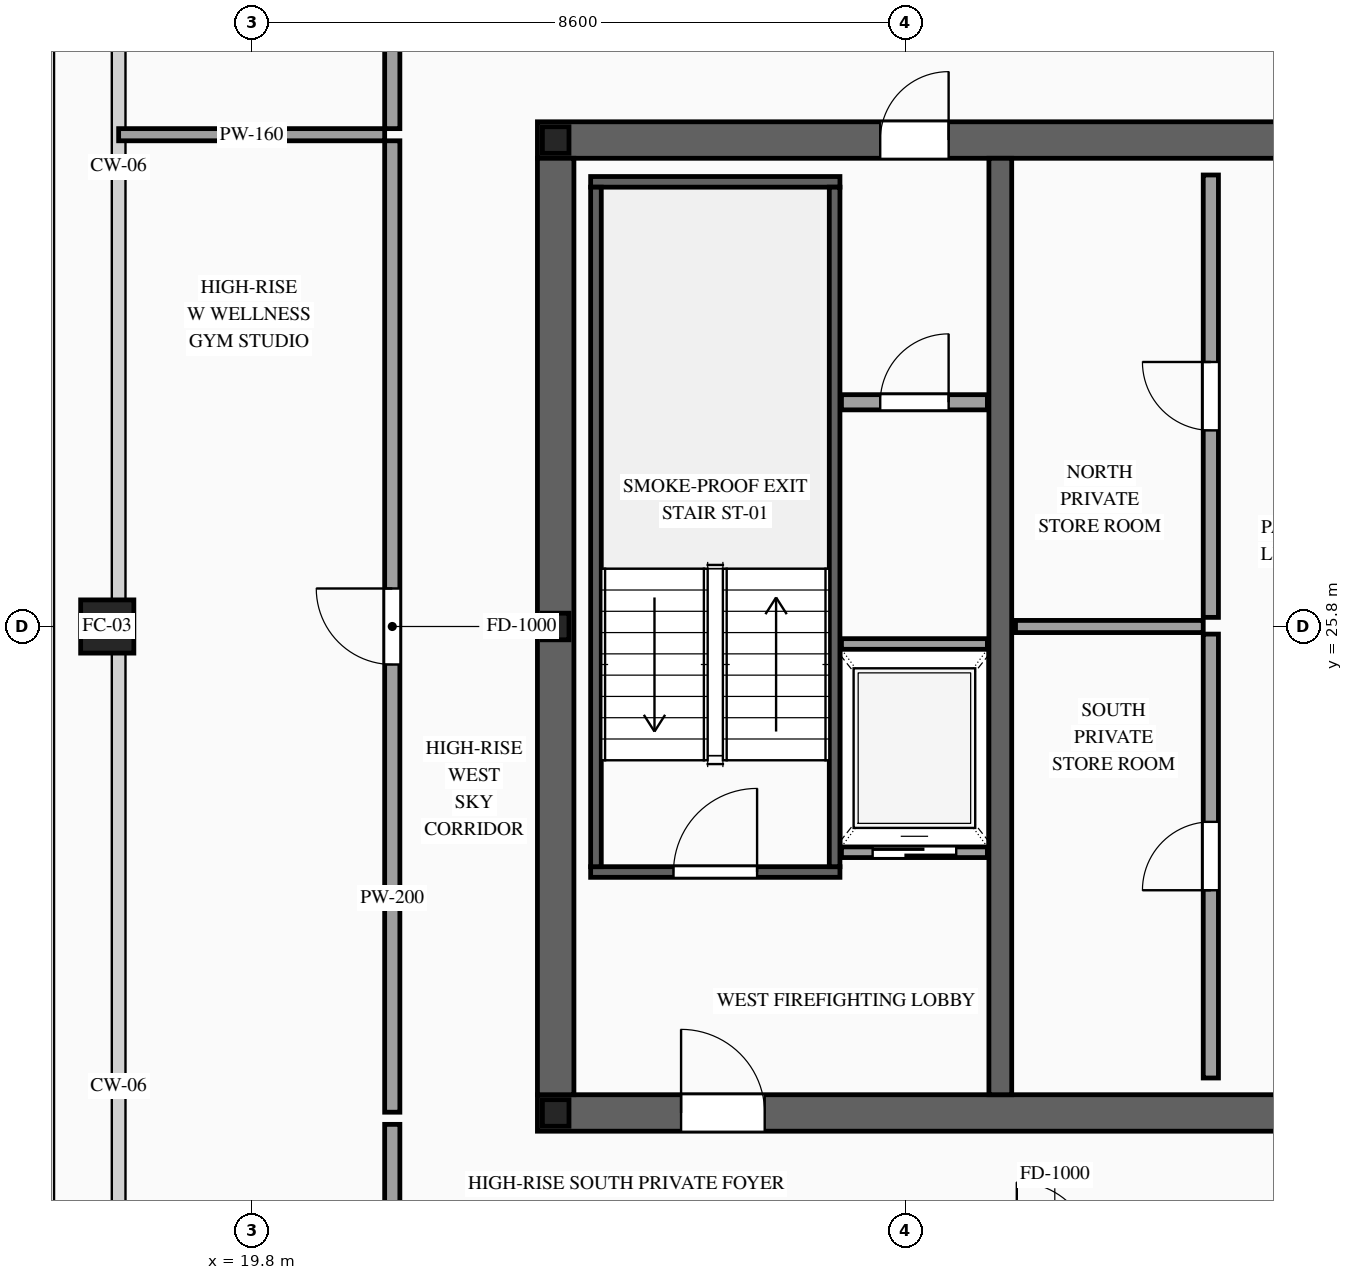
"""IFC4 building model, lengths in metres.
Left out: names, types, materials, properties, quantities, classifications, styles, units other than length and angle.
Written with IfcOpenShell. Run it as: python <this file> out.ifc"""

import sys

from ifc_helpers import new_model, si_unit, direction, frame, frame_2d, origin, origin_2d, place, context, subcontext, project, spatial, rectangle, hollow_rectangle, i_section, extrude, source, transform, mapped, element, fill, save


model = new_model("IFC4")
c1 = context("Model", 3, precision=1e-05, world=origin(), true_north=direction((0.0, 1.0)))
c2 = subcontext(c1, "Body", "Model", "MODEL_VIEW")
j1 = project(units=[si_unit("LENGTHUNIT", "METRE"), si_unit("PLANEANGLEUNIT", "RADIAN")], contexts=[c1])
p1 = place(None, origin())
s1 = spatial("IfcSite", under=j1, at=p1, CompositionType="ELEMENT")
p2 = place(p1, origin())
s2 = spatial("IfcBuilding", under=s1, at=p2, CompositionType="ELEMENT")
p3 = place(p2, frame((0.0, 0.0, 296.1)))
s3 = spatial("IfcBuildingStorey", under=s2, at=p3, CompositionType="ELEMENT", Elevation=296.1)
p4 = place(p3, frame((23.56, 19.4, 0.0), z_axis=(0.0, 0.0, 1.0), x_axis=(1.0, 0.0, 0.0)))
e1 = element("IfcWall", 1, at=p4, inside=s3, PredefinedType="SHEAR", context=c2, shape_type="SweptSolid", body=[
    extrude(rectangle(XDim=26.88, YDim=0.48, at=frame_2d((13.44, 0.0))), origin(), (0.0, 0.0, 1.0), 3.5),
])
p5 = place(p4, frame((1.89, 0.0, 0.0)))
e2 = element("IfcOpeningElement", 2, at=p5, cuts=e1, PredefinedType="OPENING", context=c2, shape_type="SweptSolid", body=[
    extrude(rectangle(XDim=1.1, YDim=2.2, at=frame_2d((0.55, 1.1))), frame((0.0, 0.255, 0.0), z_axis=(0.0, -1.0, 0.0), x_axis=(1.0, 0.0, 0.0)), (0.0, 0.0, 1.0), 0.51),
])
p6 = place(p4, frame((9.79, 0.0, 0.0)))
e3 = element("IfcOpeningElement", 3, at=p6, cuts=e1, PredefinedType="OPENING", context=c2, shape_type="SweptSolid", body=[
    extrude(rectangle(XDim=1.1, YDim=2.2, at=frame_2d((0.55, 1.1))), frame((0.0, 0.255, 0.0), z_axis=(0.0, -1.0, 0.0), x_axis=(1.0, 0.0, 0.0)), (0.0, 0.0, 1.0), 0.51),
])
p7 = place(p4, frame((22.99, 0.0, 0.0)))
e4 = element("IfcOpeningElement", 4, at=p7, cuts=e1, PredefinedType="OPENING", context=c2, shape_type="SweptSolid", body=[
    extrude(rectangle(XDim=1.1, YDim=2.2, at=frame_2d((0.55, 1.1))), frame((0.0, 0.255, 0.0), z_axis=(0.0, -1.0, 0.0), x_axis=(1.0, 0.0, 0.0)), (0.0, 0.0, 1.0), 0.51),
])
p8 = place(p4, frame((19.61, 0.0, 0.0)))
e5 = element("IfcOpeningElement", 5, at=p8, cuts=e1, PredefinedType="OPENING", context=c2, shape_type="SweptSolid", body=[
    extrude(rectangle(XDim=0.9, YDim=2.15, at=frame_2d((0.45, 1.075))), frame((0.0, 0.255, 0.0), z_axis=(0.0, -1.0, 0.0), x_axis=(1.0, 0.0, 0.0)), (0.0, 0.0, 1.0), 0.51),
])
p9 = place(p4, frame((18.17, 0.0, 0.0)))
e6 = element("IfcOpeningElement", 6, at=p9, cuts=e1, PredefinedType="OPENING", context=c2, shape_type="SweptSolid", body=[
    extrude(rectangle(XDim=0.9, YDim=2.15, at=frame_2d((0.45, 1.075))), frame((0.0, 0.255, 0.0), z_axis=(0.0, -1.0, 0.0), x_axis=(1.0, 0.0, 0.0)), (0.0, 0.0, 1.0), 0.51),
])
p10 = place(p3, frame((23.56, 32.2, 0.0), z_axis=(0.0, 0.0, 1.0), x_axis=(1.0, 0.0, 0.0)))
e7 = element("IfcWall", 7, at=p10, inside=s3, PredefinedType="SHEAR", context=c2, shape_type="SweptSolid", body=[
    extrude(rectangle(XDim=26.88, YDim=0.48, at=frame_2d((13.44, 0.0))), origin(), (0.0, 0.0, 1.0), 3.5),
])
p11 = place(p10, frame((4.51, 0.0, 0.0)))
e8 = element("IfcOpeningElement", 8, at=p11, cuts=e7, PredefinedType="OPENING", context=c2, shape_type="SweptSolid", body=[
    extrude(rectangle(XDim=0.9, YDim=2.15, at=frame_2d((0.45, 1.075))), frame((0.0, 0.255, 0.0), z_axis=(0.0, -1.0, 0.0), x_axis=(1.0, 0.0, 0.0)), (0.0, 0.0, 1.0), 0.51),
])
p12 = place(p10, frame((9.79, 0.0, 0.0)))
e9 = element("IfcOpeningElement", 9, at=p12, cuts=e7, PredefinedType="OPENING", context=c2, shape_type="SweptSolid", body=[
    extrude(rectangle(XDim=1.1, YDim=2.2, at=frame_2d((0.55, 1.1))), frame((0.0, 0.255, 0.0), z_axis=(0.0, -1.0, 0.0), x_axis=(1.0, 0.0, 0.0)), (0.0, 0.0, 1.0), 0.51),
])
p13 = place(p10, frame((15.64, 0.0, 0.0)))
e10 = element("IfcOpeningElement", 10, at=p13, cuts=e7, PredefinedType="OPENING", context=c2, shape_type="SweptSolid", body=[
    extrude(rectangle(XDim=1.1, YDim=2.2, at=frame_2d((0.55, 1.1))), frame((0.0, 0.255, 0.0), z_axis=(0.0, -1.0, 0.0), x_axis=(1.0, 0.0, 0.0)), (0.0, 0.0, 1.0), 0.51),
])
p14 = place(p10, frame((18.74, 0.0, 0.0)))
e11 = element("IfcOpeningElement", 11, at=p14, cuts=e7, PredefinedType="OPENING", context=c2, shape_type="SweptSolid", body=[
    extrude(rectangle(XDim=1.1, YDim=2.2, at=frame_2d((0.55, 1.1))), frame((0.0, 0.255, 0.0), z_axis=(0.0, -1.0, 0.0), x_axis=(1.0, 0.0, 0.0)), (0.0, 0.0, 1.0), 0.51),
])
m1 = source(origin(), c2, "Body", "SweptSolid", [
    extrude(rectangle(XDim=12.32, YDim=0.48, at=frame_2d((6.16, 0.0))), origin(), (0.0, 0.0, 1.0), 3.5),
])
p15 = place(p3, frame((23.8, 19.64, 0.0), z_axis=(0.0, 0.0, 1.0), x_axis=(0.0, 1.0, 0.0)))
e12 = element("IfcWall", 12, at=p15, inside=s3, PredefinedType="SHEAR", context=c2, shape_type="MappedRepresentation", body=[
    mapped(m1, transform((0.0, 0.0, 0.0), scale=1.0)),
])
m2 = source(origin(), c2, "Body", "SweptSolid", [
    extrude(rectangle(XDim=12.32, YDim=0.3, at=frame_2d((6.16, 0.0))), origin(), (0.0, 0.0, 1.0), 3.5),
])
p16 = place(p3, frame((29.65, 19.64, 0.0), z_axis=(0.0, 0.0, 1.0), x_axis=(0.0, 1.0, 0.0)))
e13 = element("IfcWall", 13, at=p16, inside=s3, PredefinedType="SOLIDWALL", context=c2, shape_type="MappedRepresentation", body=[
    mapped(m2, transform((0.0, 0.0, 0.0), scale=1.0)),
])
m3 = source(origin(), c2, "Body", "SweptSolid", [
    extrude(i_section(OverallWidth=0.35, OverallDepth=0.35, WebThickness=0.012, FlangeThickness=0.019, at=origin_2d()), origin(), (0.0, 0.0, 1.0), 3.5),
])
for number, where, z_axis, x_axis in (
    (14, (23.8, 19.4, 0.0), (0.0, 0.0, 1.0), (1.0, 0.0, 0.0)),
    (15, (23.8, 25.8, 0.0), (0.0, 0.0, 1.0), (1.0, 0.0, 0.0)),
    (16, (23.8, 32.2, 0.0), (0.0, 0.0, 1.0), (1.0, 0.0, 0.0)),
):
    element("IfcColumn", number, at=place(p3, frame(where, z_axis=z_axis, x_axis=x_axis)), inside=s3, PredefinedType="COLUMN", context=c2, shape_type="MappedRepresentation", body=[
        mapped(m3, transform((0.0, 0.0, 0.0), scale=1.0)),
    ])
m4 = source(origin(), c2, "Body", "SweptSolid", [
    extrude(hollow_rectangle(XDim=0.7, YDim=0.7, WallThickness=0.032, at=origin_2d()), origin(), (0.0, 0.0, 1.0), 3.5),
])
p17 = place(p3, frame((17.9, 25.8, 0.0), z_axis=(0.0, 0.0, 1.0), x_axis=(1.0, 0.0, 0.0)))
e17 = element("IfcColumn", 17, at=p17, inside=s3, PredefinedType="COLUMN", context=c2, shape_type="MappedRepresentation", body=[
    mapped(m4, transform((0.0, 0.0, 0.0), scale=1.0)),
])
p18 = place(p3, frame((27.56, 22.83, 0.0), z_axis=(0.0, 0.0, 1.0), x_axis=(1.0, 0.0, 0.0)))
e18 = element("IfcWall", 18, at=p18, inside=s3, PredefinedType="SOLIDWALL", context=c2, shape_type="SweptSolid", body=[
    extrude(rectangle(XDim=1.92, YDim=0.14, at=frame_2d((0.96, 0.0))), origin(), (0.0, 0.0, 1.0), 3.28),
])
p19 = place(p18, frame((0.41, 0.0, 0.0)))
e19 = element("IfcOpeningElement", 19, at=p19, cuts=e18, PredefinedType="OPENING", context=c2, shape_type="SweptSolid", body=[
    extrude(rectangle(XDim=1.1, YDim=2.2, at=frame_2d((0.55, 1.1))), frame((0.0, 0.085, 0.0), z_axis=(0.0, -1.0, 0.0), x_axis=(1.0, 0.0, 0.0)), (0.0, 0.0, 1.0), 0.17),
])
m5 = source(origin(), c2, "Body", "SweptSolid", [
    extrude(rectangle(XDim=1.92, YDim=0.14, at=frame_2d((0.96, 0.0))), origin(), (0.0, 0.0, 1.0), 3.28),
])
p20 = place(p3, frame((27.56, 25.57, 0.0), z_axis=(0.0, 0.0, 1.0), x_axis=(1.0, 0.0, 0.0)))
e20 = element("IfcWall", 20, at=p20, inside=s3, PredefinedType="SOLIDWALL", context=c2, shape_type="MappedRepresentation", body=[
    mapped(m5, transform((0.0, 0.0, 0.0), scale=1.0)),
])
p21 = place(p3, frame((24.26, 22.57, 0.0), z_axis=(0.0, 0.0, 1.0), x_axis=(1.0, 0.0, 0.0)))
e21 = element("IfcWall", 21, at=p21, inside=s3, PredefinedType="SOLIDWALL", context=c2, shape_type="SweptSolid", body=[
    extrude(rectangle(XDim=3.28, YDim=0.14, at=frame_2d((1.64, 0.0))), origin(), (0.0, 0.0, 1.0), 3.28),
])
p22 = place(p21, frame((1.09, 0.0, 0.0)))
e22 = element("IfcOpeningElement", 22, at=p22, cuts=e21, PredefinedType="OPENING", context=c2, shape_type="SweptSolid", body=[
    extrude(rectangle(XDim=1.1, YDim=2.2, at=frame_2d((0.55, 1.1))), frame((0.0, 0.085, 0.0), z_axis=(0.0, -1.0, 0.0), x_axis=(1.0, 0.0, 0.0)), (0.0, 0.0, 1.0), 0.17),
])
m6 = source(origin(), c2, "Body", "SweptSolid", [
    extrude(rectangle(XDim=3.28, YDim=0.14, at=frame_2d((1.64, 0.0))), origin(), (0.0, 0.0, 1.0), 3.28),
])
p23 = place(p3, frame((24.26, 31.65, 0.0), z_axis=(0.0, 0.0, 1.0), x_axis=(1.0, 0.0, 0.0)))
e23 = element("IfcWall", 23, at=p23, inside=s3, PredefinedType="SOLIDWALL", context=c2, shape_type="MappedRepresentation", body=[
    mapped(m6, transform((0.0, 0.0, 0.0), scale=1.0)),
])
m7 = source(origin(), c2, "Body", "SweptSolid", [
    extrude(rectangle(XDim=8.94, YDim=0.14, at=frame_2d((4.47, 0.0))), origin(), (0.0, 0.0, 1.0), 3.28),
])
for number, where, z_axis, x_axis in (
    (24, (24.33, 22.64, 0.0), (0.0, 0.0, 1.0), (0.0, 1.0, 0.0)),
    (25, (27.47, 22.64, 0.0), (0.0, 0.0, 1.0), (0.0, 1.0, 0.0)),
):
    element("IfcWall", number, at=place(p3, frame(where, z_axis=z_axis, x_axis=x_axis)), inside=s3, PredefinedType="SOLIDWALL", context=c2, shape_type="MappedRepresentation", body=[
        mapped(m7, transform((0.0, 0.0, 0.0), scale=1.0)),
    ])
p24 = place(p3, frame((27.56, 28.75, 0.0), z_axis=(0.0, 0.0, 1.0), x_axis=(1.0, 0.0, 0.0)))
e26 = element("IfcWall", 26, at=p24, inside=s3, PredefinedType="PARTITIONING", context=c2, shape_type="SweptSolid", body=[
    extrude(rectangle(XDim=1.92, YDim=0.2, at=frame_2d((0.96, 0.0))), origin(), (0.0, 0.0, 1.0), 3.28),
])
p25 = place(p24, frame((0.51, 0.0, 0.0)))
e27 = element("IfcOpeningElement", 27, at=p25, cuts=e26, PredefinedType="OPENING", context=c2, shape_type="SweptSolid", body=[
    extrude(rectangle(XDim=0.9, YDim=2.15, at=frame_2d((0.45, 1.075))), frame((0.0, 0.115, 0.0), z_axis=(0.0, -1.0, 0.0), x_axis=(1.0, 0.0, 0.0)), (0.0, 0.0, 1.0), 0.23),
])
p26 = place(p3, frame((32.42, 19.86, 0.0), z_axis=(0.0, 0.0, 1.0), x_axis=(0.0, 1.0, 0.0)))
e28 = element("IfcWall", 28, at=p26, inside=s3, PredefinedType="PARTITIONING", context=c2, shape_type="SweptSolid", body=[
    extrude(rectangle(XDim=5.84, YDim=0.2, at=frame_2d((2.92, 0.0))), origin(), (0.0, 0.0, 1.0), 3.28),
])
p27 = place(p26, frame((2.47, 0.0, 0.0)))
e29 = element("IfcOpeningElement", 29, at=p27, cuts=e28, PredefinedType="OPENING", context=c2, shape_type="SweptSolid", body=[
    extrude(rectangle(XDim=0.9, YDim=2.15, at=frame_2d((0.45, 1.075))), frame((0.0, 0.115, 0.0), z_axis=(0.0, -1.0, 0.0), x_axis=(1.0, 0.0, 0.0)), (0.0, 0.0, 1.0), 0.23),
])
p28 = place(p3, frame((32.42, 25.92, 0.0), z_axis=(0.0, 0.0, 1.0), x_axis=(0.0, 1.0, 0.0)))
e30 = element("IfcWall", 30, at=p28, inside=s3, PredefinedType="PARTITIONING", context=c2, shape_type="SweptSolid", body=[
    extrude(rectangle(XDim=5.82, YDim=0.2, at=frame_2d((2.91, 0.0))), origin(), (0.0, 0.0, 1.0), 3.28),
])
p29 = place(p28, frame((2.46, 0.0, 0.0)))
e31 = element("IfcOpeningElement", 31, at=p29, cuts=e30, PredefinedType="OPENING", context=c2, shape_type="SweptSolid", body=[
    extrude(rectangle(XDim=0.9, YDim=2.15, at=frame_2d((0.45, 1.075))), frame((0.0, 0.115, 0.0), z_axis=(0.0, -1.0, 0.0), x_axis=(1.0, 0.0, 0.0)), (0.0, 0.0, 1.0), 0.23),
])
m8 = source(origin(), c2, "Body", "SweptSolid", [
    extrude(rectangle(XDim=2.47, YDim=0.16, at=frame_2d((1.235, 0.0))), origin(), (0.0, 0.0, 1.0), 3.28),
])
p30 = place(p3, frame((29.85, 25.8, 0.0), z_axis=(0.0, 0.0, 1.0), x_axis=(1.0, 0.0, 0.0)))
e32 = element("IfcWall", 32, at=p30, inside=s3, PredefinedType="PARTITIONING", context=c2, shape_type="MappedRepresentation", body=[
    mapped(m8, transform((0.0, 0.0, 0.0), scale=1.0)),
])
m9 = source(origin(), c2, "Body", "SweptSolid", [
    extrude(rectangle(XDim=1.7, YDim=0.2, at=frame_2d((0.85, 0.0))), origin(), (0.0, 0.0, 1.0), 3.28),
])
for number, where, z_axis, x_axis in (
    (33, (21.65, 32.35, 0.0), (0.0, 0.0, 1.0), (0.0, 1.0, 0.0)),
    (34, (21.65, 17.55, 0.0), (0.0, 0.0, 1.0), (0.0, 1.0, 0.0)),
):
    element("IfcWall", number, at=place(p3, frame(where, z_axis=z_axis, x_axis=x_axis)), inside=s3, PredefinedType="PARTITIONING", context=c2, shape_type="MappedRepresentation", body=[
        mapped(m9, transform((0.0, 0.0, 0.0), scale=1.0)),
    ])
p31 = place(p3, frame((21.65, 19.41, 0.0), z_axis=(0.0, 0.0, 1.0), x_axis=(0.0, 1.0, 0.0)))
e35 = element("IfcWall", 35, at=p31, inside=s3, PredefinedType="PARTITIONING", context=c2, shape_type="SweptSolid", body=[
    extrude(rectangle(XDim=12.78, YDim=0.2, at=frame_2d((6.39, 0.0))), origin(), (0.0, 0.0, 1.0), 3.28),
])
p32 = place(p31, frame((5.89, 0.0, 0.0)))
e36 = element("IfcOpeningElement", 36, at=p32, cuts=e35, PredefinedType="OPENING", context=c2, shape_type="SweptSolid", body=[
    extrude(rectangle(XDim=1.0, YDim=2.2, at=frame_2d((0.5, 1.1))), frame((0.0, 0.115, 0.0), z_axis=(0.0, -1.0, 0.0), x_axis=(1.0, 0.0, 0.0)), (0.0, 0.0, 1.0), 0.23),
])
m10 = source(origin(), c2, "Body", "SweptSolid", [
    extrude(rectangle(XDim=3.5, YDim=0.16, at=frame_2d((1.75, 0.0))), origin(), (0.0, 0.0, 1.0), 2.825),
])
p33 = place(p3, frame((18.05, 32.27, 0.0), z_axis=(0.0, 0.0, 1.0), x_axis=(1.0, 0.0, 0.0)))
e37 = element("IfcWall", 37, at=p33, inside=s3, PredefinedType="PARTITIONING", context=c2, shape_type="MappedRepresentation", body=[
    mapped(m10, transform((0.0, 0.0, 0.0), scale=1.0)),
])
m11 = source(origin(), c2, "Body", "SweptSolid", [
    extrude(rectangle(XDim=1.1, YDim=2.2, at=frame_2d((0.55, 1.1))), frame((0.0, 0.025, 0.0), z_axis=(0.0, -1.0, 0.0), x_axis=(1.0, 0.0, 0.0)), (0.0, 0.0, 1.0), 0.05),
])
p34 = place(p19, origin())
e38 = element("IfcDoor", 38, at=p34, inside=s3, OperationType="SLIDING_TO_LEFT", PredefinedType="DOOR", context=c2, shape_type="MappedRepresentation", body=[
    mapped(m11, transform((0.0, 0.0, 0.0), scale=1.0)),
])
fill(e19, e38)
m12 = source(origin(), c2, "Body", "SweptSolid", [
    extrude(rectangle(XDim=1.1, YDim=2.2, at=frame_2d((0.55, 1.1))), frame((0.0, 0.025, 0.0), z_axis=(0.0, -1.0, 0.0), x_axis=(1.0, 0.0, 0.0)), (0.0, 0.0, 1.0), 0.05),
])
p35 = place(p22, origin())
e39 = element("IfcDoor", 39, at=p35, inside=s3, OperationType="SINGLE_SWING_RIGHT", PredefinedType="DOOR", context=c2, shape_type="MappedRepresentation", body=[
    mapped(m12, transform((0.0, 0.0, 0.0), scale=1.0)),
])
fill(e22, e39)
p36 = place(p5, origin())
e40 = element("IfcDoor", 40, at=p36, inside=s3, OperationType="SINGLE_SWING_LEFT", PredefinedType="DOOR", context=c2, shape_type="MappedRepresentation", body=[
    mapped(m12, transform((0.0, 0.0, 0.0), scale=1.0)),
])
fill(e2, e40)
m13 = source(origin(), c2, "Body", "SweptSolid", [
    extrude(rectangle(XDim=0.9, YDim=2.15, at=frame_2d((0.45, 1.075))), frame((0.0, 0.025, 0.0), z_axis=(0.0, -1.0, 0.0), x_axis=(1.0, 0.0, 0.0)), (0.0, 0.0, 1.0), 0.05),
])
p37 = place(p11, origin())
e41 = element("IfcDoor", 41, at=p37, inside=s3, OperationType="SINGLE_SWING_RIGHT", PredefinedType="DOOR", context=c2, shape_type="MappedRepresentation", body=[
    mapped(m13, transform((0.0, 0.0, 0.0), scale=1.0)),
])
fill(e8, e41)
p38 = place(p25, origin())
e42 = element("IfcDoor", 42, at=p38, inside=s3, OperationType="SINGLE_SWING_RIGHT", PredefinedType="DOOR", context=c2, shape_type="MappedRepresentation", body=[
    mapped(m13, transform((0.0, 0.0, 0.0), scale=1.0)),
])
fill(e27, e42)
p39 = place(p27, origin())
e43 = element("IfcDoor", 43, at=p39, inside=s3, OperationType="SINGLE_SWING_LEFT", PredefinedType="DOOR", context=c2, shape_type="MappedRepresentation", body=[
    mapped(m13, transform((0.0, 0.0, 0.0), scale=1.0)),
])
fill(e29, e43)
p40 = place(p29, origin())
e44 = element("IfcDoor", 44, at=p40, inside=s3, OperationType="SINGLE_SWING_RIGHT", PredefinedType="DOOR", context=c2, shape_type="MappedRepresentation", body=[
    mapped(m13, transform((0.0, 0.0, 0.0), scale=1.0)),
])
fill(e31, e44)
m14 = source(origin(), c2, "Body", "SweptSolid", [
    extrude(rectangle(XDim=1.0, YDim=2.2, at=frame_2d((0.5, 1.1))), frame((0.0, 0.025, 0.0), z_axis=(0.0, -1.0, 0.0), x_axis=(1.0, 0.0, 0.0)), (0.0, 0.0, 1.0), 0.05),
])
p41 = place(p32, origin())
e45 = element("IfcDoor", 45, at=p41, inside=s3, OperationType="SINGLE_SWING_RIGHT", PredefinedType="DOOR", context=c2, shape_type="MappedRepresentation", body=[
    mapped(m14, transform((0.0, 0.0, 0.0), scale=1.0)),
])
fill(e36, e45)
save(model, sys.argv[1])
